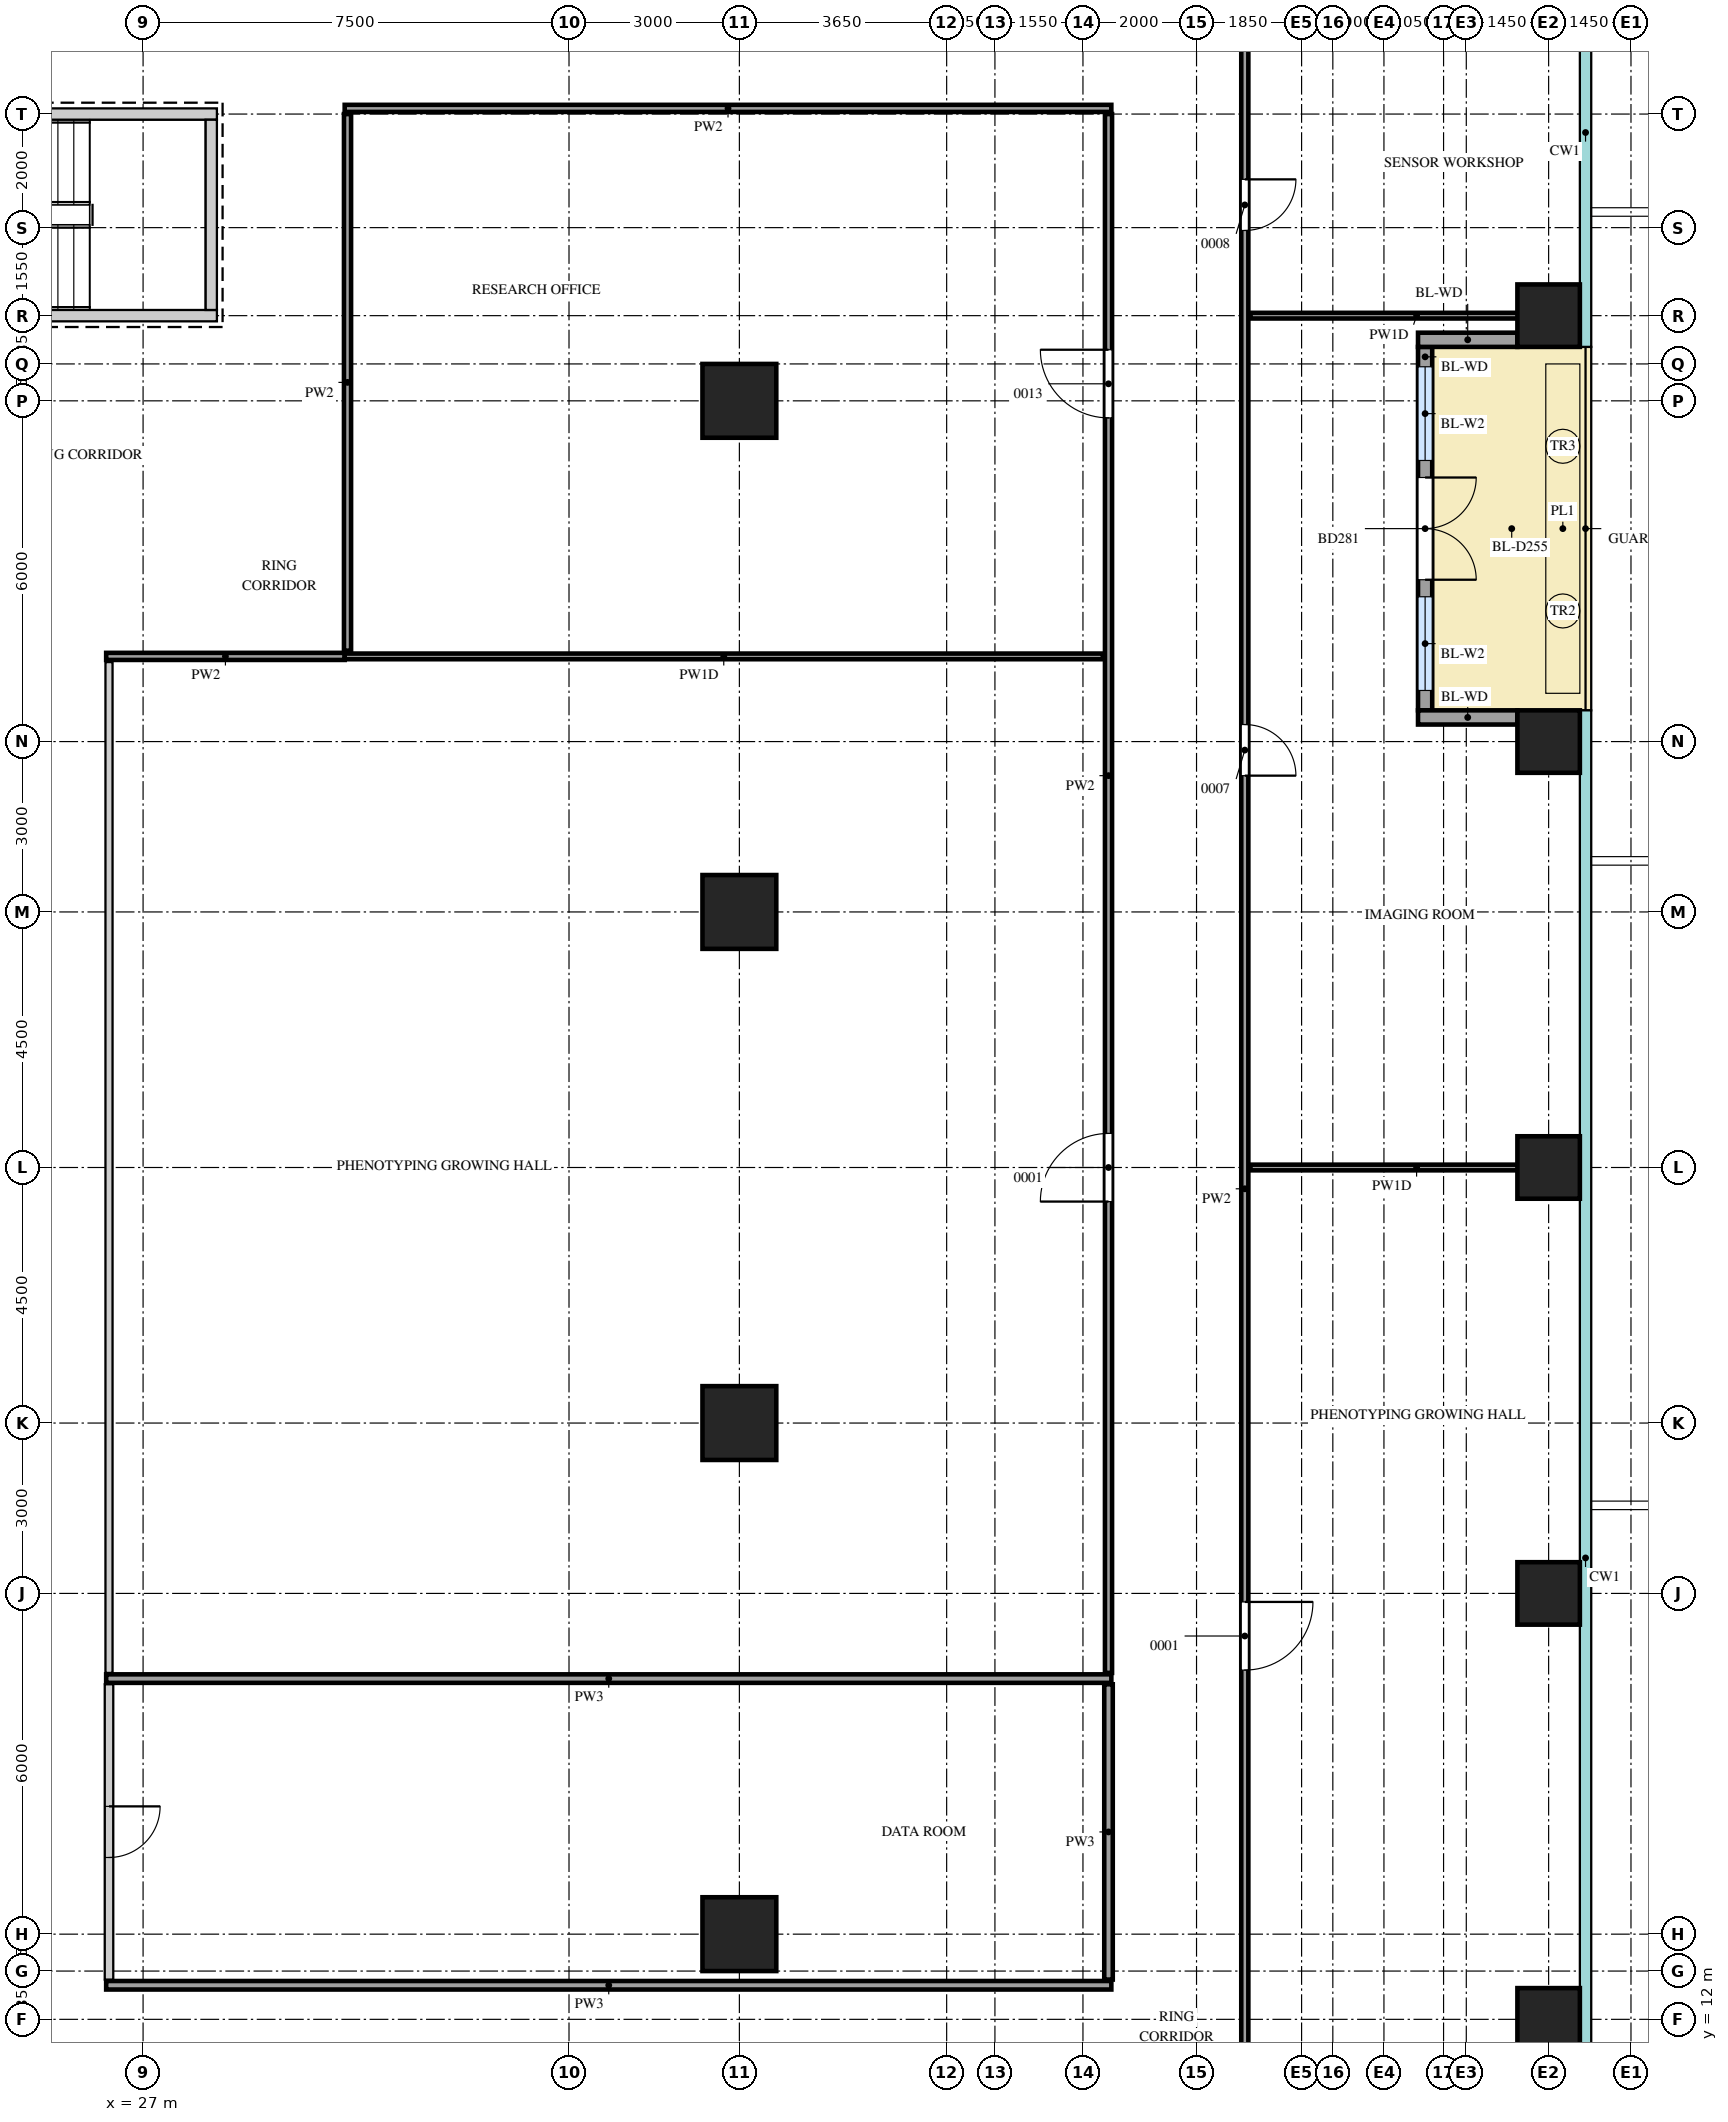
"""IFC4 building model, lengths in metres.
Left out: names, types, materials, properties, quantities, classifications, styles, units other than length and angle.
Written with IfcOpenShell. Run it as: python <this file> out.ifc"""

import sys

from ifc_helpers import new_model, si_unit, direction, frame, frame_2d, origin, origin_2d, place, context, subcontext, project, spatial, rectangle, extrude, source, transform, mapped, element, fill, save


model = new_model("IFC4")
c1 = context("Model", 3, precision=1e-05, world=origin(), true_north=direction((0.0, 1.0)))
c2 = subcontext(c1, "Body", "Model", "MODEL_VIEW")
j1 = project(units=[si_unit("LENGTHUNIT", "METRE"), si_unit("PLANEANGLEUNIT", "RADIAN")], contexts=[c1])
p1 = place(None, origin())
s1 = spatial("IfcSite", under=j1, at=p1, CompositionType="ELEMENT")
p2 = place(p1, origin())
s2 = spatial("IfcBuilding", under=s1, at=p2, CompositionType="ELEMENT")
p3 = place(p2, frame((0.0, 0.0, 132.3)))
s3 = spatial("IfcBuildingStorey", under=s2, at=p3, CompositionType="ELEMENT", Elevation=132.3)
m1 = source(origin(), c2, "Body", "SweptSolid", [
    extrude(rectangle(XDim=7.1, YDim=0.2, at=frame_2d((3.55, 0.0))), origin(), (0.0, 0.0, 1.0), 4.1),
])
p4 = place(p3, frame((21.2, 45.55, 0.0), z_axis=(0.0, 0.0, 1.0), x_axis=(1.0, 0.0, 0.0)))
e1 = element("IfcWall", 1, at=p4, inside=s3, PredefinedType="SHEAR", context=c2, shape_type="MappedRepresentation", body=[
    mapped(m1, transform((0.0, 0.0, 0.0))),
])
m2 = source(origin(), c2, "Body", "SweptSolid", [
    extrude(rectangle(XDim=1.2, YDim=2.1, at=frame_2d((0.6, 1.05))), frame((0.0, 0.11, 0.0), z_axis=(0.0, -1.0, 0.0), x_axis=(1.0, 0.0, 0.0)), (0.0, 0.0, 1.0), 0.22),
])
p5 = place(p4, frame((0.15, 0.0, 0.0)))
e2 = element("IfcOpeningElement", 2, at=p5, cuts=e1, PredefinedType="OPENING", context=c2, shape_type="MappedRepresentation", body=[
    mapped(m2, transform((0.0, 0.0, 0.0))),
])
p6 = place(p3, frame((21.2, 42.0, 0.0), z_axis=(0.0, 0.0, 1.0), x_axis=(1.0, 0.0, 0.0)))
e3 = element("IfcWall", 3, at=p6, inside=s3, PredefinedType="SHEAR", context=c2, shape_type="MappedRepresentation", body=[
    mapped(m1, transform((0.0, 0.0, 0.0))),
])
m3 = source(origin(), c2, "Body", "SweptSolid", [
    extrude(rectangle(XDim=3.35, YDim=0.2, at=frame_2d((1.675, 0.0))), origin(), (0.0, 0.0, 1.0), 4.1),
])
p7 = place(p3, frame((28.2, 42.1, 0.0), z_axis=(0.0, 0.0, 1.0), x_axis=(0.0, 1.0, 0.0)))
e4 = element("IfcWall", 4, at=p7, inside=s3, PredefinedType="SHEAR", context=c2, shape_type="MappedRepresentation", body=[
    mapped(m3, transform((0.0, 0.0, 0.0))),
])
m4 = source(origin(), c2, "Body", "SweptSolid", [
    extrude(rectangle(XDim=1.1, YDim=1.1, at=origin_2d()), origin(), (0.0, 0.0, 1.0), 4.1),
])
for number, where, z_axis, x_axis in (
    (5, (51.75, 12.0, 0.0), (0.0, 0.0, 1.0), (1.0, 0.0, 0.0)),
    (6, (51.75, 19.5, 0.0), (0.0, 0.0, 1.0), (1.0, 0.0, 0.0)),
    (7, (51.75, 27.0, 0.0), (0.0, 0.0, 1.0), (1.0, 0.0, 0.0)),
    (8, (51.75, 34.5, 0.0), (0.0, 0.0, 1.0), (1.0, 0.0, 0.0)),
    (9, (51.75, 42.0, 0.0), (0.0, 0.0, 1.0), (1.0, 0.0, 0.0)),
):
    element("IfcColumn", number, at=place(p3, frame(where, z_axis=z_axis, x_axis=x_axis)), inside=s3, PredefinedType="COLUMN", context=c2, shape_type="MappedRepresentation", body=[
        mapped(m4, transform((0.0, 0.0, 0.0))),
    ])
m5 = source(origin(), c2, "Body", "SweptSolid", [
    extrude(rectangle(XDim=1.3, YDim=1.3, at=origin_2d()), origin(), (0.0, 0.0, 1.0), 4.1),
])
for number, where, z_axis, x_axis in (
    (10, (37.5, 13.5, 0.0), (0.0, 0.0, 1.0), (1.0, 0.0, 0.0)),
    (11, (37.5, 22.5, 0.0), (0.0, 0.0, 1.0), (1.0, 0.0, 0.0)),
    (12, (37.5, 31.5, 0.0), (0.0, 0.0, 1.0), (1.0, 0.0, 0.0)),
    (13, (37.5, 40.5, 0.0), (0.0, 0.0, 1.0), (1.0, 0.0, 0.0)),
):
    element("IfcColumn", number, at=place(p3, frame(where, z_axis=z_axis, x_axis=x_axis)), inside=s3, PredefinedType="COLUMN", context=c2, shape_type="MappedRepresentation", body=[
        mapped(m5, transform((0.0, 0.0, 0.0))),
    ])
m6 = source(origin(), c2, "Body", "SweptSolid", [
    extrude(rectangle(XDim=6.4, YDim=0.25, at=frame_2d((3.2, 0.0))), origin(), (0.0, 0.0, 1.0), 3.55),
])
p8 = place(p3, frame((49.575, 35.05, 0.0), z_axis=(0.0, 0.0, 1.0), x_axis=(0.0, 1.0, 0.0)))
e14 = element("IfcWall", 14, at=p8, inside=s3, PredefinedType="SOLIDWALL", context=c2, shape_type="MappedRepresentation", body=[
    mapped(m6, transform((0.0, 0.0, 0.0))),
])
m7 = source(origin(), c2, "Body", "SweptSolid", [
    extrude(rectangle(XDim=1.65, YDim=2.4, at=frame_2d((0.825, 1.2))), frame((0.0, 0.135, 0.0), z_axis=(0.0, -1.0, 0.0), x_axis=(1.0, 0.0, 0.0)), (0.0, 0.0, 1.0), 0.27),
])
p9 = place(p8, frame((0.35, 0.0, 0.0)))
e15 = element("IfcOpeningElement", 15, at=p9, cuts=e14, PredefinedType="OPENING", context=c2, shape_type="MappedRepresentation", body=[
    mapped(m7, transform((0.0, 0.0, 0.0))),
])
p10 = place(p8, frame((4.4, 0.0, 0.0)))
e16 = element("IfcOpeningElement", 16, at=p10, cuts=e14, PredefinedType="OPENING", context=c2, shape_type="MappedRepresentation", body=[
    mapped(m7, transform((0.0, 0.0, 0.0))),
])
m8 = source(origin(), c2, "Body", "SweptSolid", [
    extrude(rectangle(XDim=1.8, YDim=2.4, at=frame_2d((0.9, 1.2))), frame((0.0, 0.135, 0.0), z_axis=(0.0, -1.0, 0.0), x_axis=(1.0, 0.0, 0.0)), (0.0, 0.0, 1.0), 0.27),
])
p11 = place(p8, frame((2.3, 0.0, 0.0)))
e17 = element("IfcOpeningElement", 17, at=p11, cuts=e14, PredefinedType="OPENING", context=c2, shape_type="MappedRepresentation", body=[
    mapped(m8, transform((0.0, 0.0, 0.0))),
])
m9 = source(origin(), c2, "Body", "SweptSolid", [
    extrude(rectangle(XDim=1.75, YDim=0.25, at=frame_2d((0.875, 0.0))), origin(), (0.0, 0.0, 1.0), 3.55),
])
for number, where, z_axis, x_axis in (
    (18, (51.2, 34.925, 0.0), (0.0, 0.0, 1.0), (-1.0, 0.0, 0.0)),
    (19, (51.2, 41.575, 0.0), (0.0, 0.0, 1.0), (-1.0, 0.0, 0.0)),
):
    element("IfcWall", number, at=place(p3, frame(where, z_axis=z_axis, x_axis=x_axis)), inside=s3, PredefinedType="SOLIDWALL", context=c2, shape_type="MappedRepresentation", body=[
        mapped(m9, transform((0.0, 0.0, 0.0))),
    ])
m10 = source(origin(), c2, "Body", "SweptSolid", [
    extrude(rectangle(XDim=37.65, YDim=0.125, at=frame_2d((18.825, 0.0))), origin(), (0.0, 0.0, 1.0), 4.2),
])
p12 = place(p3, frame((46.4, 10.3, 0.0), z_axis=(0.0, 0.0, 1.0), x_axis=(0.0, 1.0, 0.0)))
e20 = element("IfcWall", 20, at=p12, inside=s3, PredefinedType="PARTITIONING", context=c2, shape_type="MappedRepresentation", body=[
    mapped(m10, transform((0.0, 0.0, 0.0))),
])
m11 = source(origin(), c2, "Body", "SweptSolid", [
    extrude(rectangle(XDim=1.2, YDim=2.1, at=frame_2d((0.6, 1.05))), frame((0.0, 0.073, 0.0), z_axis=(0.0, -1.0, 0.0), x_axis=(1.0, 0.0, 0.0)), (0.0, 0.0, 1.0), 0.145),
])
p13 = place(p12, frame((7.85, 0.0, 0.0)))
e21 = element("IfcOpeningElement", 21, at=p13, cuts=e20, PredefinedType="OPENING", context=c2, shape_type="MappedRepresentation", body=[
    mapped(m11, transform((0.0, 0.0, 0.0))),
])
m12 = source(origin(), c2, "Body", "SweptSolid", [
    extrude(rectangle(XDim=0.9, YDim=2.1, at=frame_2d((0.45, 1.05))), frame((0.0, 0.073, 0.0), z_axis=(0.0, -1.0, 0.0), x_axis=(1.0, 0.0, 0.0)), (0.0, 0.0, 1.0), 0.145),
])
p14 = place(p12, frame((23.6, 0.0, 0.0)))
e22 = element("IfcOpeningElement", 22, at=p14, cuts=e20, PredefinedType="OPENING", context=c2, shape_type="MappedRepresentation", body=[
    mapped(m12, transform((0.0, 0.0, 0.0))),
])
p15 = place(p12, frame((33.2, 0.0, 0.0)))
e23 = element("IfcOpeningElement", 23, at=p15, cuts=e20, PredefinedType="OPENING", context=c2, shape_type="MappedRepresentation", body=[
    mapped(m12, transform((0.0, 0.0, 0.0))),
])
m13 = source(origin(), c2, "Body", "SweptSolid", [
    extrude(rectangle(XDim=17.7, YDim=0.15, at=frame_2d((8.85, 0.0))), origin(), (0.0, 0.0, 1.0), 4.2),
])
p16 = place(p3, frame((26.35, 12.6, 0.0), z_axis=(0.0, 0.0, 1.0), x_axis=(1.0, 0.0, 0.0)))
e24 = element("IfcWall", 24, at=p16, inside=s3, PredefinedType="PARTITIONING", context=c2, shape_type="MappedRepresentation", body=[
    mapped(m13, transform((0.0, 0.0, 0.0))),
])
m14 = source(origin(), c2, "Body", "SweptSolid", [
    extrude(rectangle(XDim=5.2, YDim=0.15, at=frame_2d((2.6, 0.0))), origin(), (0.0, 0.0, 1.0), 4.2),
])
p17 = place(p3, frame((26.4, 12.7, 0.0), z_axis=(0.0, 0.0, 1.0), x_axis=(0.0, 1.0, 0.0)))
e25 = element("IfcWall", 25, at=p17, inside=s3, PredefinedType="PARTITIONING", context=c2, shape_type="MappedRepresentation", body=[
    mapped(m14, transform((0.0, 0.0, 0.0))),
])
m15 = source(origin(), c2, "Body", "SweptSolid", [
    extrude(rectangle(XDim=0.9, YDim=2.1, at=frame_2d((0.45, 1.05))), frame((0.0, 0.085, 0.0), z_axis=(0.0, -1.0, 0.0), x_axis=(1.0, 0.0, 0.0)), (0.0, 0.0, 1.0), 0.17),
])
p18 = place(p17, frame((2.15, 0.0, 0.0)))
e26 = element("IfcOpeningElement", 26, at=p18, cuts=e25, PredefinedType="OPENING", context=c2, shape_type="MappedRepresentation", body=[
    mapped(m15, transform((0.0, 0.0, 0.0))),
])
p19 = place(p3, frame((44.0, 12.7, 0.0), z_axis=(0.0, 0.0, 1.0), x_axis=(0.0, 1.0, 0.0)))
e27 = element("IfcWall", 27, at=p19, inside=s3, PredefinedType="PARTITIONING", context=c2, shape_type="MappedRepresentation", body=[
    mapped(m14, transform((0.0, 0.0, 0.0))),
])
p20 = place(p3, frame((26.35, 18.0, 0.0), z_axis=(0.0, 0.0, 1.0), x_axis=(1.0, 0.0, 0.0)))
e28 = element("IfcWall", 28, at=p20, inside=s3, PredefinedType="PARTITIONING", context=c2, shape_type="MappedRepresentation", body=[
    mapped(m13, transform((0.0, 0.0, 0.0))),
])
m16 = source(origin(), c2, "Body", "SweptSolid", [
    extrude(rectangle(XDim=17.8, YDim=0.125, at=frame_2d((8.9, 0.0))), origin(), (0.0, 0.0, 1.0), 4.2),
])
p21 = place(p3, frame((26.4, 18.1, 0.0), z_axis=(0.0, 0.0, 1.0), x_axis=(0.0, 1.0, 0.0)))
e29 = element("IfcWall", 29, at=p21, inside=s3, PredefinedType="PARTITIONING", context=c2, shape_type="MappedRepresentation", body=[
    mapped(m16, transform((0.0, 0.0, 0.0))),
])
m17 = source(origin(), c2, "Body", "SweptSolid", [
    extrude(rectangle(XDim=27.45, YDim=0.125, at=frame_2d((13.725, 0.0))), origin(), (0.0, 0.0, 1.0), 4.2),
])
p22 = place(p3, frame((44.0, 18.1, 0.0), z_axis=(0.0, 0.0, 1.0), x_axis=(0.0, 1.0, 0.0)))
e30 = element("IfcWall", 30, at=p22, inside=s3, PredefinedType="PARTITIONING", context=c2, shape_type="MappedRepresentation", body=[
    mapped(m17, transform((0.0, 0.0, 0.0))),
])
p23 = place(p22, frame((8.3, 0.0, 0.0)))
e31 = element("IfcOpeningElement", 31, at=p23, cuts=e30, PredefinedType="OPENING", context=c2, shape_type="MappedRepresentation", body=[
    mapped(m11, transform((0.0, 0.0, 0.0))),
])
p24 = place(p22, frame((22.1, 0.0, 0.0)))
e32 = element("IfcOpeningElement", 32, at=p24, cuts=e30, PredefinedType="OPENING", context=c2, shape_type="MappedRepresentation", body=[
    mapped(m11, transform((0.0, 0.0, 0.0))),
])
m18 = source(origin(), c2, "Body", "SweptSolid", [
    extrude(rectangle(XDim=5.85, YDim=0.1, at=frame_2d((2.925, 0.0))), origin(), (0.0, 0.0, 1.0), 4.2),
])
p25 = place(p3, frame((46.5, 27.0, 0.0), z_axis=(0.0, 0.0, 1.0), x_axis=(1.0, 0.0, 0.0)))
e33 = element("IfcWall", 33, at=p25, inside=s3, PredefinedType="PARTITIONING", context=c2, shape_type="MappedRepresentation", body=[
    mapped(m18, transform((0.0, 0.0, 0.0))),
])
m19 = source(origin(), c2, "Body", "SweptSolid", [
    extrude(rectangle(XDim=4.2, YDim=0.125, at=frame_2d((2.1, 0.0))), origin(), (0.0, 0.0, 1.0), 4.2),
])
p26 = place(p3, frame((26.35, 36.0, 0.0), z_axis=(0.0, 0.0, 1.0), x_axis=(1.0, 0.0, 0.0)))
e34 = element("IfcWall", 34, at=p26, inside=s3, PredefinedType="PARTITIONING", context=c2, shape_type="MappedRepresentation", body=[
    mapped(m19, transform((0.0, 0.0, 0.0))),
])
m20 = source(origin(), c2, "Body", "SweptSolid", [
    extrude(rectangle(XDim=13.35, YDim=0.1, at=frame_2d((6.675, 0.0))), origin(), (0.0, 0.0, 1.0), 4.2),
])
p27 = place(p3, frame((30.55, 36.0, 0.0), z_axis=(0.0, 0.0, 1.0), x_axis=(1.0, 0.0, 0.0)))
e35 = element("IfcWall", 35, at=p27, inside=s3, PredefinedType="PARTITIONING", context=c2, shape_type="MappedRepresentation", body=[
    mapped(m20, transform((0.0, 0.0, 0.0))),
])
m21 = source(origin(), c2, "Body", "SweptSolid", [
    extrude(rectangle(XDim=9.45, YDim=0.125, at=frame_2d((4.725, 0.0))), origin(), (0.0, 0.0, 1.0), 4.2),
])
p28 = place(p3, frame((30.6, 36.1, 0.0), z_axis=(0.0, 0.0, 1.0), x_axis=(0.0, 1.0, 0.0)))
e36 = element("IfcWall", 36, at=p28, inside=s3, PredefinedType="PARTITIONING", context=c2, shape_type="MappedRepresentation", body=[
    mapped(m21, transform((0.0, 0.0, 0.0))),
])
p29 = place(p3, frame((46.5, 42.0, 0.0), z_axis=(0.0, 0.0, 1.0), x_axis=(1.0, 0.0, 0.0)))
e37 = element("IfcWall", 37, at=p29, inside=s3, PredefinedType="PARTITIONING", context=c2, shape_type="MappedRepresentation", body=[
    mapped(m18, transform((0.0, 0.0, 0.0))),
])
m22 = source(origin(), c2, "Body", "SweptSolid", [
    extrude(rectangle(XDim=13.5, YDim=0.125, at=frame_2d((6.75, 0.0))), origin(), (0.0, 0.0, 1.0), 4.2),
])
p30 = place(p3, frame((30.55, 45.65, 0.0), z_axis=(0.0, 0.0, 1.0), x_axis=(1.0, 0.0, 0.0)))
e38 = element("IfcWall", 38, at=p30, inside=s3, PredefinedType="PARTITIONING", context=c2, shape_type="MappedRepresentation", body=[
    mapped(m22, transform((0.0, 0.0, 0.0))),
])
m23 = source(origin(), c2, "Body", "SweptSolid", [
    extrude(rectangle(XDim=1.65, YDim=2.4, at=frame_2d((0.825, 1.2))), frame((0.0, 0.03, 0.0), z_axis=(0.0, -1.0, 0.0), x_axis=(1.0, 0.0, 0.0)), (0.0, 0.0, 1.0), 0.06),
])
p31 = place(p9, origin())
e39 = element("IfcWindow", 39, at=p31, inside=s3, PartitioningType="SINGLE_PANEL", PredefinedType="WINDOW", context=c2, shape_type="MappedRepresentation", body=[
    mapped(m23, transform((0.0, 0.0, 0.0))),
])
fill(e15, e39)
p32 = place(p10, origin())
e40 = element("IfcWindow", 40, at=p32, inside=s3, PartitioningType="SINGLE_PANEL", PredefinedType="WINDOW", context=c2, shape_type="MappedRepresentation", body=[
    mapped(m23, transform((0.0, 0.0, 0.0))),
])
fill(e16, e40)
m24 = source(origin(), c2, "Body", "SweptSolid", [
    extrude(rectangle(XDim=1.8, YDim=2.4, at=frame_2d((0.9, 1.2))), frame((0.0, 0.025, 0.0), z_axis=(0.0, -1.0, 0.0), x_axis=(1.0, 0.0, 0.0)), (0.0, 0.0, 1.0), 0.05),
])
p33 = place(p11, origin())
e41 = element("IfcDoor", 41, at=p33, inside=s3, OperationType="DOUBLE_DOOR_DOUBLE_SWING", PredefinedType="DOOR", context=c2, shape_type="MappedRepresentation", body=[
    mapped(m24, transform((0.0, 0.0, 0.0))),
])
fill(e17, e41)
m25 = source(origin(), c2, "Body", "SweptSolid", [
    extrude(rectangle(XDim=0.9, YDim=2.1, at=frame_2d((0.45, 1.05))), frame((0.0, 0.025, 0.0), z_axis=(0.0, -1.0, 0.0), x_axis=(1.0, 0.0, 0.0)), (0.0, 0.0, 1.0), 0.05),
])
p34 = place(p18, origin())
e42 = element("IfcDoor", 42, at=p34, inside=s3, OperationType="SINGLE_SWING_RIGHT", PredefinedType="DOOR", context=c2, shape_type="MappedRepresentation", body=[
    mapped(m25, transform((0.0, 0.0, 0.0))),
])
fill(e26, e42)
m26 = source(origin(), c2, "Body", "SweptSolid", [
    extrude(rectangle(XDim=1.2, YDim=2.1, at=frame_2d((0.6, 1.05))), frame((0.0, 0.025, 0.0), z_axis=(0.0, -1.0, 0.0), x_axis=(1.0, 0.0, 0.0)), (0.0, 0.0, 1.0), 0.05),
])
p35 = place(p23, origin())
e43 = element("IfcDoor", 43, at=p35, inside=s3, OperationType="SINGLE_SWING_RIGHT", PredefinedType="DOOR", context=c2, shape_type="MappedRepresentation", body=[
    mapped(m26, transform((0.0, 0.0, 0.0))),
])
fill(e31, e43)
p36 = place(p24, origin())
e44 = element("IfcDoor", 44, at=p36, inside=s3, OperationType="SINGLE_SWING_LEFT", PredefinedType="DOOR", context=c2, shape_type="MappedRepresentation", body=[
    mapped(m26, transform((0.0, 0.0, 0.0))),
])
fill(e32, e44)
p37 = place(p13, origin())
e45 = element("IfcDoor", 45, at=p37, inside=s3, OperationType="SINGLE_SWING_RIGHT", PredefinedType="DOOR", context=c2, shape_type="MappedRepresentation", body=[
    mapped(m26, transform((0.0, 0.0, 0.0))),
])
fill(e21, e45)
p38 = place(p14, origin())
e46 = element("IfcDoor", 46, at=p38, inside=s3, OperationType="SINGLE_SWING_LEFT", PredefinedType="DOOR", context=c2, shape_type="MappedRepresentation", body=[
    mapped(m25, transform((0.0, 0.0, 0.0))),
])
fill(e22, e46)
p39 = place(p15, origin())
e47 = element("IfcDoor", 47, at=p39, inside=s3, OperationType="SINGLE_SWING_RIGHT", PredefinedType="DOOR", context=c2, shape_type="MappedRepresentation", body=[
    mapped(m25, transform((0.0, 0.0, 0.0))),
])
fill(e23, e47)
save(model, sys.argv[1])
